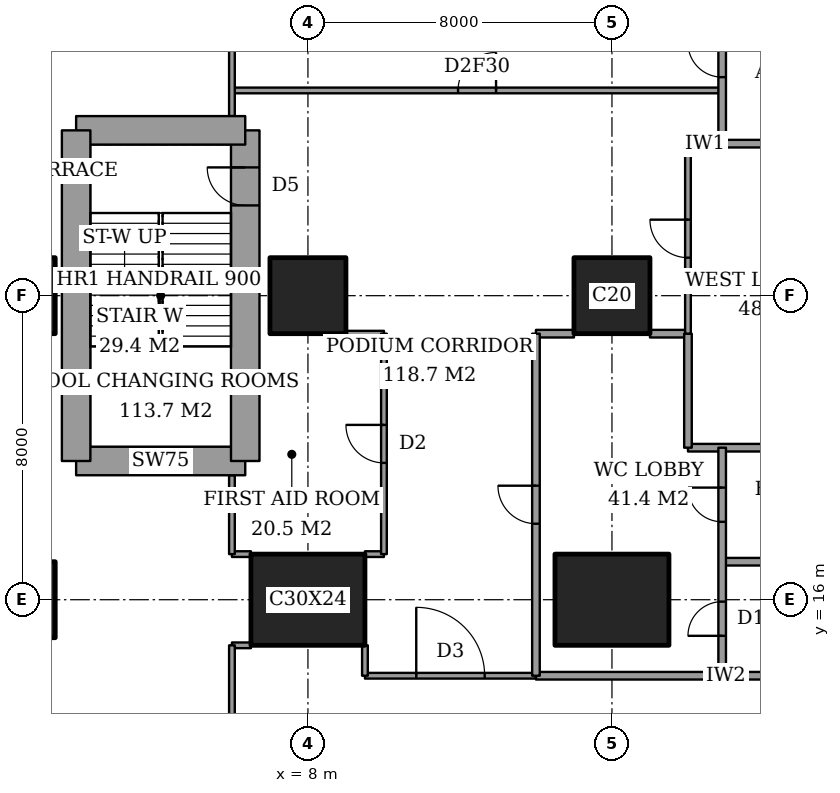
"""IFC4 building model, lengths in metres.
Left out: names, types, materials, properties, quantities, classifications, styles, units other than length and angle.
Written with IfcOpenShell. Run it as: python <this file> out.ifc"""

import sys

from ifc_helpers import new_model, si_unit, direction, frame, frame_2d, origin, origin_2d, place, context, subcontext, project, spatial, rectangle, extrude, element, fill, save


model = new_model("IFC4")
c1 = context("Model", 3, precision=1e-05, world=origin(), true_north=direction((0.0, 1.0)))
c2 = subcontext(c1, "Body", "Model", "MODEL_VIEW")
j1 = project(units=[si_unit("LENGTHUNIT", "METRE"), si_unit("PLANEANGLEUNIT", "RADIAN")], contexts=[c1])
p1 = place(None, origin())
s1 = spatial("IfcSite", under=j1, at=p1, CompositionType="ELEMENT")
p2 = place(p1, origin())
s2 = spatial("IfcBuilding", under=s1, at=p2, CompositionType="ELEMENT")
p3 = place(p2, frame((0.0, 0.0, 16.0)))
s3 = spatial("IfcBuildingStorey", under=s2, at=p3, CompositionType="ELEMENT", Elevation=16.0)
for number, where, z_axis, x_axis in (
    (1, (0.35, 16.0, 0.0), (0.0, 0.0, 1.0), (1.0, 0.0, 0.0)),
    (2, (0.35, 24.0, 0.0), (0.0, 0.0, 1.0), (1.0, 0.0, 0.0)),
):
    element("IfcColumn", number, at=place(p3, frame(where, z_axis=z_axis, x_axis=x_axis)), inside=s3, PredefinedType="COLUMN", context=c2, shape_type="SweptSolid", body=[
        extrude(rectangle(XDim=2.0, YDim=2.0, at=origin_2d()), origin(), (0.0, 0.0, 1.0), 5.0),
    ])
p4 = place(p3, frame((8.0, 16.0, 0.0), z_axis=(0.0, 0.0, 1.0), x_axis=(1.0, 0.0, 0.0)))
e3 = element("IfcColumn", 3, at=p4, inside=s3, PredefinedType="COLUMN", context=c2, shape_type="SweptSolid", body=[
    extrude(rectangle(XDim=3.0, YDim=2.4, at=origin_2d()), origin(), (0.0, 0.0, 1.0), 5.0),
])
p5 = place(p3, frame((8.0, 24.0, 0.0), z_axis=(0.0, 0.0, 1.0), x_axis=(1.0, 0.0, 0.0)))
e4 = element("IfcColumn", 4, at=p5, inside=s3, PredefinedType="COLUMN", context=c2, shape_type="SweptSolid", body=[
    extrude(rectangle(XDim=2.0, YDim=2.0, at=origin_2d()), origin(), (0.0, 0.0, 1.0), 5.0),
])
p6 = place(p3, frame((16.0, 16.0, 0.0), z_axis=(0.0, 0.0, 1.0), x_axis=(1.0, 0.0, 0.0)))
e5 = element("IfcColumn", 5, at=p6, inside=s3, PredefinedType="COLUMN", context=c2, shape_type="SweptSolid", body=[
    extrude(rectangle(XDim=3.0, YDim=2.4, at=origin_2d()), origin(), (0.0, 0.0, 1.0), 5.0),
])
p7 = place(p3, frame((16.0, 24.0, 0.0), z_axis=(0.0, 0.0, 1.0), x_axis=(1.0, 0.0, 0.0)))
e6 = element("IfcColumn", 6, at=p7, inside=s3, PredefinedType="COLUMN", context=c2, shape_type="SweptSolid", body=[
    extrude(rectangle(XDim=2.0, YDim=2.0, at=origin_2d()), origin(), (0.0, 0.0, 1.0), 5.0),
])
p8 = place(p3, frame((1.9, 19.65, 0.0), z_axis=(0.0, 0.0, 1.0), x_axis=(1.0, 0.0, 0.0)))
e7 = element("IfcWall", 7, at=p8, inside=s3, PredefinedType="SHEAR", context=c2, shape_type="SweptSolid", body=[
    extrude(rectangle(XDim=4.45, YDim=0.75, at=frame_2d((2.225, 0.0))), origin(), (0.0, 0.0, 1.0), 5.0),
])
p9 = place(p3, frame((6.35, 19.65, 0.0), z_axis=(0.0, 0.0, 1.0), x_axis=(0.0, 1.0, 0.0)))
e8 = element("IfcWall", 8, at=p9, inside=s3, PredefinedType="SHEAR", context=c2, shape_type="SweptSolid", body=[
    extrude(rectangle(XDim=8.7, YDim=0.75, at=frame_2d((4.35, 0.0))), origin(), (0.0, 0.0, 1.0), 5.0),
])
p10 = place(p9, frame((6.725, 0.0, 0.0)))
e9 = element("IfcOpeningElement", 9, at=p10, cuts=e8, PredefinedType="OPENING", context=c2, shape_type="SweptSolid", body=[
    extrude(rectangle(XDim=1.0, YDim=2.1, at=frame_2d((0.5, 1.05))), frame((0.0, 0.385, 0.0), z_axis=(0.0, -1.0, 0.0), x_axis=(1.0, 0.0, 0.0)), (0.0, 0.0, 1.0), 0.77),
])
p11 = place(p3, frame((6.35, 28.35, 0.0), z_axis=(0.0, 0.0, 1.0), x_axis=(-1.0, 0.0, 0.0)))
e10 = element("IfcWall", 10, at=p11, inside=s3, PredefinedType="SHEAR", context=c2, shape_type="SweptSolid", body=[
    extrude(rectangle(XDim=4.45, YDim=0.75, at=frame_2d((2.225, 0.0))), origin(), (0.0, 0.0, 1.0), 5.0),
])
p12 = place(p3, frame((1.9, 28.35, 0.0), z_axis=(0.0, 0.0, 1.0), x_axis=(0.0, -1.0, 0.0)))
e11 = element("IfcWall", 11, at=p12, inside=s3, PredefinedType="SHEAR", context=c2, shape_type="SweptSolid", body=[
    extrude(rectangle(XDim=8.7, YDim=0.75, at=frame_2d((4.35, 0.0))), origin(), (0.0, 0.0, 1.0), 5.0),
])
p13 = place(p3, frame((14.0, 14.0, 0.0), z_axis=(0.0, 0.0, 1.0), x_axis=(1.0, 0.0, 0.0)))
e12 = element("IfcWall", 12, at=p13, inside=s3, PredefinedType="PARTITIONING", context=c2, shape_type="SweptSolid", body=[
    extrude(rectangle(XDim=10.0, YDim=0.2, at=frame_2d((5.0, 0.0))), origin(), (0.0, 0.0, 1.0), 4.7),
])
p14 = place(p3, frame((9.5, 14.0, 0.0), z_axis=(0.0, 0.0, 1.0), x_axis=(1.0, 0.0, 0.0)))
e13 = element("IfcWall", 13, at=p14, inside=s3, PredefinedType="PARTITIONING", context=c2, shape_type="SweptSolid", body=[
    extrude(rectangle(XDim=4.5, YDim=0.15, at=frame_2d((2.25, 0.0))), origin(), (0.0, 0.0, 1.0), 4.7),
])
p15 = place(p14, frame((1.35, 0.0, 0.0)))
e14 = element("IfcOpeningElement", 14, at=p15, cuts=e13, PredefinedType="OPENING", context=c2, shape_type="SweptSolid", body=[
    extrude(rectangle(XDim=1.8, YDim=2.1, at=frame_2d((0.9, 1.05))), frame((0.0, 0.085, 0.0), z_axis=(0.0, -1.0, 0.0), x_axis=(1.0, 0.0, 0.0)), (0.0, 0.0, 1.0), 0.17),
])
p16 = place(p3, frame((6.0, 14.8, 0.0), z_axis=(0.0, 0.0, 1.0), x_axis=(1.0, 0.0, 0.0)))
e15 = element("IfcWall", 15, at=p16, inside=s3, PredefinedType="PARTITIONING", context=c2, shape_type="SweptSolid", body=[
    extrude(rectangle(XDim=0.5, YDim=0.15, at=frame_2d((0.25, 0.0))), origin(), (0.0, 0.0, 1.0), 4.7),
])
p17 = place(p3, frame((18.9, 17.0, 0.0), z_axis=(0.0, 0.0, 1.0), x_axis=(1.0, 0.0, 0.0)))
e16 = element("IfcWall", 16, at=p17, inside=s3, PredefinedType="PARTITIONING", context=c2, shape_type="SweptSolid", body=[
    extrude(rectangle(XDim=5.1, YDim=0.2, at=frame_2d((2.55, 0.0))), origin(), (0.0, 0.0, 1.0), 4.7),
])
for number, where, z_axis, x_axis in (
    (17, (6.0, 17.2, 0.0), (0.0, 0.0, 1.0), (1.0, 0.0, 0.0)),
    (18, (9.5, 17.2, 0.0), (0.0, 0.0, 1.0), (1.0, 0.0, 0.0)),
):
    element("IfcWall", number, at=place(p3, frame(where, z_axis=z_axis, x_axis=x_axis)), inside=s3, PredefinedType="PARTITIONING", context=c2, shape_type="SweptSolid", body=[
        extrude(rectangle(XDim=0.5, YDim=0.15, at=frame_2d((0.25, 0.0))), origin(), (0.0, 0.0, 1.0), 4.7),
    ])
p18 = place(p3, frame((18.0, 20.0, 0.0), z_axis=(0.0, 0.0, 1.0), x_axis=(1.0, 0.0, 0.0)))
e19 = element("IfcWall", 19, at=p18, inside=s3, PredefinedType="PARTITIONING", context=c2, shape_type="SweptSolid", body=[
    extrude(rectangle(XDim=6.0, YDim=0.2, at=frame_2d((3.0, 0.0))), origin(), (0.0, 0.0, 1.0), 4.7),
])
for number, where, z_axis, x_axis in (
    (20, (14.0, 23.0, 0.0), (0.0, 0.0, 1.0), (1.0, 0.0, 0.0)),
    (21, (17.0, 23.0, 0.0), (0.0, 0.0, 1.0), (1.0, 0.0, 0.0)),
):
    element("IfcWall", number, at=place(p3, frame(where, z_axis=z_axis, x_axis=x_axis)), inside=s3, PredefinedType="PARTITIONING", context=c2, shape_type="SweptSolid", body=[
        extrude(rectangle(XDim=1.0, YDim=0.2, at=frame_2d((0.5, 0.0))), origin(), (0.0, 0.0, 1.0), 4.7),
    ])
p19 = place(p3, frame((9.0, 23.0, 0.0), z_axis=(0.0, 0.0, 1.0), x_axis=(1.0, 0.0, 0.0)))
e22 = element("IfcWall", 22, at=p19, inside=s3, PredefinedType="PARTITIONING", context=c2, shape_type="SweptSolid", body=[
    extrude(rectangle(XDim=1.0, YDim=0.15, at=frame_2d((0.5, 0.0))), origin(), (0.0, 0.0, 1.0), 4.7),
])
p20 = place(p3, frame((18.9, 28.0, 0.0), z_axis=(0.0, 0.0, 1.0), x_axis=(1.0, 0.0, 0.0)))
e23 = element("IfcWall", 23, at=p20, inside=s3, PredefinedType="PARTITIONING", context=c2, shape_type="SweptSolid", body=[
    extrude(rectangle(XDim=5.1, YDim=0.2, at=frame_2d((2.55, 0.0))), origin(), (0.0, 0.0, 1.0), 4.7),
])
p21 = place(p3, frame((18.0, 28.0, 0.0), z_axis=(0.0, 0.0, 1.0), x_axis=(1.0, 0.0, 0.0)))
e24 = element("IfcWall", 24, at=p21, inside=s3, PredefinedType="PARTITIONING", context=c2, shape_type="SweptSolid", body=[
    extrude(rectangle(XDim=0.9, YDim=0.15, at=frame_2d((0.45, 0.0))), origin(), (0.0, 0.0, 1.0), 4.7),
])
p22 = place(p3, frame((6.0, 29.4, 0.0), z_axis=(0.0, 0.0, 1.0), x_axis=(1.0, 0.0, 0.0)))
e25 = element("IfcWall", 25, at=p22, inside=s3, PredefinedType="PARTITIONING", context=c2, shape_type="SweptSolid", body=[
    extrude(rectangle(XDim=12.9, YDim=0.15, at=frame_2d((6.45, 0.0))), origin(), (0.0, 0.0, 1.0), 4.7),
])
p23 = place(p22, frame((5.95, 0.0, 0.0)))
e26 = element("IfcOpeningElement", 26, at=p23, cuts=e25, PredefinedType="OPENING", context=c2, shape_type="SweptSolid", body=[
    extrude(rectangle(XDim=1.0, YDim=2.1, at=frame_2d((0.5, 1.05))), frame((0.0, 0.085, 0.0), z_axis=(0.0, -1.0, 0.0), x_axis=(1.0, 0.0, 0.0)), (0.0, 0.0, 1.0), 0.17),
])
p24 = place(p3, frame((6.0, 12.0, 0.0), z_axis=(0.0, 0.0, 1.0), x_axis=(0.0, 1.0, 0.0)))
e27 = element("IfcWall", 27, at=p24, inside=s3, PredefinedType="PARTITIONING", context=c2, shape_type="SweptSolid", body=[
    extrude(rectangle(XDim=2.8, YDim=0.15, at=frame_2d((1.4, 0.0))), origin(), (0.0, 0.0, 1.0), 4.7),
])
p25 = place(p3, frame((6.0, 17.2, 0.0), z_axis=(0.0, 0.0, 1.0), x_axis=(0.0, 1.0, 0.0)))
e28 = element("IfcWall", 28, at=p25, inside=s3, PredefinedType="PARTITIONING", context=c2, shape_type="SweptSolid", body=[
    extrude(rectangle(XDim=2.075, YDim=0.15, at=frame_2d((1.038, 0.0))), origin(), (0.0, 0.0, 1.0), 4.7),
])
p26 = place(p3, frame((6.0, 28.725, 0.0), z_axis=(0.0, 0.0, 1.0), x_axis=(0.0, 1.0, 0.0)))
e29 = element("IfcWall", 29, at=p26, inside=s3, PredefinedType="PARTITIONING", context=c2, shape_type="SweptSolid", body=[
    extrude(rectangle(XDim=7.275, YDim=0.15, at=frame_2d((3.637, 0.0))), origin(), (0.0, 0.0, 1.0), 4.7),
])
p27 = place(p3, frame((9.5, 14.0, 0.0), z_axis=(0.0, 0.0, 1.0), x_axis=(0.0, 1.0, 0.0)))
e30 = element("IfcWall", 30, at=p27, inside=s3, PredefinedType="PARTITIONING", context=c2, shape_type="SweptSolid", body=[
    extrude(rectangle(XDim=0.8, YDim=0.15, at=frame_2d((0.4, 0.0))), origin(), (0.0, 0.0, 1.0), 4.7),
])
p28 = place(p3, frame((10.0, 17.2, 0.0), z_axis=(0.0, 0.0, 1.0), x_axis=(0.0, 1.0, 0.0)))
e31 = element("IfcWall", 31, at=p28, inside=s3, PredefinedType="PARTITIONING", context=c2, shape_type="SweptSolid", body=[
    extrude(rectangle(XDim=5.8, YDim=0.15, at=frame_2d((2.9, 0.0))), origin(), (0.0, 0.0, 1.0), 4.7),
])
p29 = place(p28, frame((2.4, 0.0, 0.0)))
e32 = element("IfcOpeningElement", 32, at=p29, cuts=e31, PredefinedType="OPENING", context=c2, shape_type="SweptSolid", body=[
    extrude(rectangle(XDim=1.0, YDim=2.1, at=frame_2d((0.5, 1.05))), frame((0.0, 0.085, 0.0), z_axis=(0.0, -1.0, 0.0), x_axis=(1.0, 0.0, 0.0)), (0.0, 0.0, 1.0), 0.17),
])
p30 = place(p3, frame((14.0, 14.0, 0.0), z_axis=(0.0, 0.0, 1.0), x_axis=(0.0, 1.0, 0.0)))
e33 = element("IfcWall", 33, at=p30, inside=s3, PredefinedType="PARTITIONING", context=c2, shape_type="SweptSolid", body=[
    extrude(rectangle(XDim=9.0, YDim=0.2, at=frame_2d((4.5, 0.0))), origin(), (0.0, 0.0, 1.0), 4.7),
])
p31 = place(p30, frame((4.0, 0.0, 0.0)))
e34 = element("IfcOpeningElement", 34, at=p31, cuts=e33, PredefinedType="OPENING", context=c2, shape_type="SweptSolid", body=[
    extrude(rectangle(XDim=1.0, YDim=2.1, at=frame_2d((0.5, 1.05))), frame((0.0, 0.11, 0.0), z_axis=(0.0, -1.0, 0.0), x_axis=(1.0, 0.0, 0.0)), (0.0, 0.0, 1.0), 0.22),
])
p32 = place(p3, frame((18.0, 20.0, 0.0), z_axis=(0.0, 0.0, 1.0), x_axis=(0.0, 1.0, 0.0)))
e35 = element("IfcWall", 35, at=p32, inside=s3, PredefinedType="PARTITIONING", context=c2, shape_type="SweptSolid", body=[
    extrude(rectangle(XDim=3.0, YDim=0.2, at=frame_2d((1.5, 0.0))), origin(), (0.0, 0.0, 1.0), 4.7),
])
p33 = place(p3, frame((18.0, 23.0, 0.0), z_axis=(0.0, 0.0, 1.0), x_axis=(0.0, 1.0, 0.0)))
e36 = element("IfcWall", 36, at=p33, inside=s3, PredefinedType="PARTITIONING", context=c2, shape_type="SweptSolid", body=[
    extrude(rectangle(XDim=5.0, YDim=0.15, at=frame_2d((2.5, 0.0))), origin(), (0.0, 0.0, 1.0), 4.7),
])
p34 = place(p33, frame((2.0, 0.0, 0.0)))
e37 = element("IfcOpeningElement", 37, at=p34, cuts=e36, PredefinedType="OPENING", context=c2, shape_type="SweptSolid", body=[
    extrude(rectangle(XDim=1.0, YDim=2.1, at=frame_2d((0.5, 1.05))), frame((0.0, 0.085, 0.0), z_axis=(0.0, -1.0, 0.0), x_axis=(1.0, 0.0, 0.0)), (0.0, 0.0, 1.0), 0.17),
])
p35 = place(p3, frame((18.9, 14.0, 0.0), z_axis=(0.0, 0.0, 1.0), x_axis=(0.0, 1.0, 0.0)))
e38 = element("IfcWall", 38, at=p35, inside=s3, PredefinedType="PARTITIONING", context=c2, shape_type="SweptSolid", body=[
    extrude(rectangle(XDim=6.0, YDim=0.2, at=frame_2d((3.0, 0.0))), origin(), (0.0, 0.0, 1.0), 4.7),
])
p36 = place(p35, frame((1.05, 0.0, 0.0)))
e39 = element("IfcOpeningElement", 39, at=p36, cuts=e38, PredefinedType="OPENING", context=c2, shape_type="SweptSolid", body=[
    extrude(rectangle(XDim=0.9, YDim=2.1, at=frame_2d((0.45, 1.05))), frame((0.0, 0.11, 0.0), z_axis=(0.0, -1.0, 0.0), x_axis=(1.0, 0.0, 0.0)), (0.0, 0.0, 1.0), 0.22),
])
p37 = place(p35, frame((4.05, 0.0, 0.0)))
e40 = element("IfcOpeningElement", 40, at=p37, cuts=e38, PredefinedType="OPENING", context=c2, shape_type="SweptSolid", body=[
    extrude(rectangle(XDim=0.9, YDim=2.1, at=frame_2d((0.45, 1.05))), frame((0.0, 0.11, 0.0), z_axis=(0.0, -1.0, 0.0), x_axis=(1.0, 0.0, 0.0)), (0.0, 0.0, 1.0), 0.22),
])
p38 = place(p3, frame((18.9, 28.0, 0.0), z_axis=(0.0, 0.0, 1.0), x_axis=(0.0, 1.0, 0.0)))
e41 = element("IfcWall", 41, at=p38, inside=s3, PredefinedType="PARTITIONING", context=c2, shape_type="SweptSolid", body=[
    extrude(rectangle(XDim=3.0, YDim=0.2, at=frame_2d((1.5, 0.0))), origin(), (0.0, 0.0, 1.0), 4.7),
])
p39 = place(p38, frame((1.75, 0.0, 0.0)))
e42 = element("IfcOpeningElement", 42, at=p39, cuts=e41, PredefinedType="OPENING", context=c2, shape_type="SweptSolid", body=[
    extrude(rectangle(XDim=0.9, YDim=2.1, at=frame_2d((0.45, 1.05))), frame((0.0, 0.11, 0.0), z_axis=(0.0, -1.0, 0.0), x_axis=(1.0, 0.0, 0.0)), (0.0, 0.0, 1.0), 0.22),
])
p40 = place(p15, origin())
e43 = element("IfcDoor", 43, at=p40, inside=s3, OperationType="DOUBLE_DOOR_DOUBLE_SWING", PredefinedType="DOOR", context=c2, shape_type="SweptSolid", body=[
    extrude(rectangle(XDim=1.8, YDim=2.1, at=frame_2d((0.9, 1.05))), frame((0.0, 0.025, 0.0), z_axis=(0.0, -1.0, 0.0), x_axis=(1.0, 0.0, 0.0)), (0.0, 0.0, 1.0), 0.05),
])
fill(e14, e43)
p41 = place(p29, origin())
e44 = element("IfcDoor", 44, at=p41, inside=s3, OperationType="SINGLE_SWING_LEFT", PredefinedType="DOOR", context=c2, shape_type="SweptSolid", body=[
    extrude(rectangle(XDim=1.0, YDim=2.1, at=frame_2d((0.5, 1.05))), frame((0.0, 0.025, 0.0), z_axis=(0.0, -1.0, 0.0), x_axis=(1.0, 0.0, 0.0)), (0.0, 0.0, 1.0), 0.05),
])
fill(e32, e44)
p42 = place(p31, origin())
e45 = element("IfcDoor", 45, at=p42, inside=s3, OperationType="SINGLE_SWING_LEFT", PredefinedType="DOOR", context=c2, shape_type="SweptSolid", body=[
    extrude(rectangle(XDim=1.0, YDim=2.1, at=frame_2d((0.5, 1.05))), frame((0.0, 0.025, 0.0), z_axis=(0.0, -1.0, 0.0), x_axis=(1.0, 0.0, 0.0)), (0.0, 0.0, 1.0), 0.05),
])
fill(e34, e45)
p43 = place(p34, origin())
e46 = element("IfcDoor", 46, at=p43, inside=s3, OperationType="SINGLE_SWING_LEFT", PredefinedType="DOOR", context=c2, shape_type="SweptSolid", body=[
    extrude(rectangle(XDim=1.0, YDim=2.1, at=frame_2d((0.5, 1.05))), frame((0.0, 0.025, 0.0), z_axis=(0.0, -1.0, 0.0), x_axis=(1.0, 0.0, 0.0)), (0.0, 0.0, 1.0), 0.05),
])
fill(e37, e46)
p44 = place(p36, origin())
e47 = element("IfcDoor", 47, at=p44, inside=s3, OperationType="SINGLE_SWING_RIGHT", PredefinedType="DOOR", context=c2, shape_type="SweptSolid", body=[
    extrude(rectangle(XDim=0.9, YDim=2.1, at=frame_2d((0.45, 1.05))), frame((0.0, 0.025, 0.0), z_axis=(0.0, -1.0, 0.0), x_axis=(1.0, 0.0, 0.0)), (0.0, 0.0, 1.0), 0.05),
])
fill(e39, e47)
p45 = place(p37, origin())
e48 = element("IfcDoor", 48, at=p45, inside=s3, OperationType="SINGLE_SWING_LEFT", PredefinedType="DOOR", context=c2, shape_type="SweptSolid", body=[
    extrude(rectangle(XDim=0.9, YDim=2.1, at=frame_2d((0.45, 1.05))), frame((0.0, 0.025, 0.0), z_axis=(0.0, -1.0, 0.0), x_axis=(1.0, 0.0, 0.0)), (0.0, 0.0, 1.0), 0.05),
])
fill(e40, e48)
p46 = place(p39, origin())
e49 = element("IfcDoor", 49, at=p46, inside=s3, OperationType="SINGLE_SWING_LEFT", PredefinedType="DOOR", context=c2, shape_type="SweptSolid", body=[
    extrude(rectangle(XDim=0.9, YDim=2.1, at=frame_2d((0.45, 1.05))), frame((0.0, 0.025, 0.0), z_axis=(0.0, -1.0, 0.0), x_axis=(1.0, 0.0, 0.0)), (0.0, 0.0, 1.0), 0.05),
])
fill(e42, e49)
p47 = place(p23, origin())
e50 = element("IfcDoor", 50, at=p47, inside=s3, OperationType="SINGLE_SWING_LEFT", PredefinedType="DOOR", context=c2, shape_type="SweptSolid", body=[
    extrude(rectangle(XDim=1.0, YDim=2.1, at=frame_2d((0.5, 1.05))), frame((0.0, 0.025, 0.0), z_axis=(0.0, -1.0, 0.0), x_axis=(1.0, 0.0, 0.0)), (0.0, 0.0, 1.0), 0.05),
])
fill(e26, e50)
p48 = place(p10, origin())
e51 = element("IfcDoor", 51, at=p48, inside=s3, OperationType="SINGLE_SWING_LEFT", PredefinedType="DOOR", context=c2, shape_type="SweptSolid", body=[
    extrude(rectangle(XDim=1.0, YDim=2.1, at=frame_2d((0.5, 1.05))), frame((0.0, 0.025, 0.0), z_axis=(0.0, -1.0, 0.0), x_axis=(1.0, 0.0, 0.0)), (0.0, 0.0, 1.0), 0.05),
])
fill(e9, e51)
save(model, sys.argv[1])
